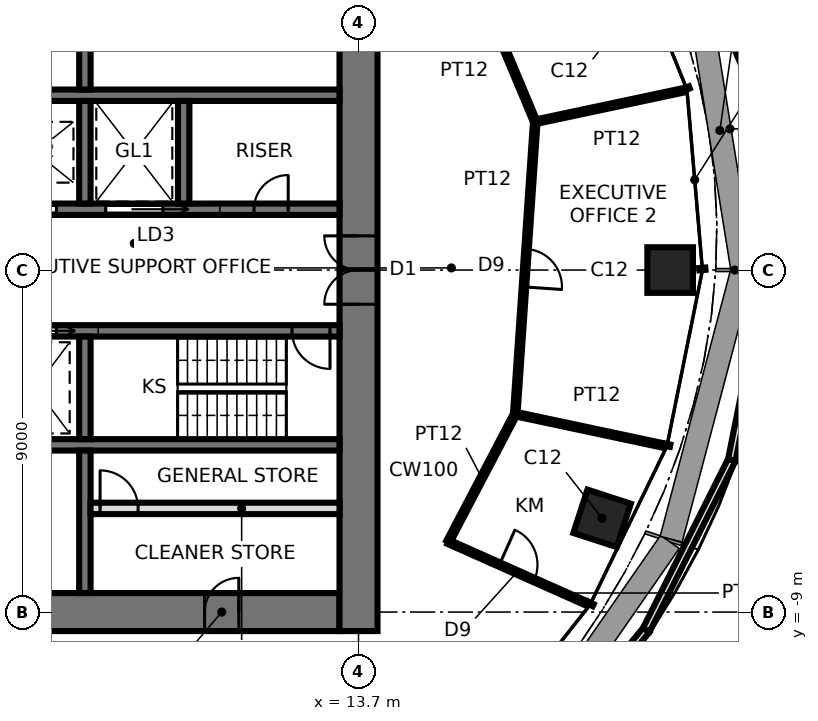
"""IFC4 building model, lengths in metres.
Left out: names, types, materials, properties, quantities, classifications, styles, units other than length and angle.
Written with IfcOpenShell. Run it as: python <this file> out.ifc"""

import sys

from ifc_helpers import new_model, si_unit, direction, frame, frame_2d, origin, origin_2d, place, context, subcontext, project, spatial, rectangle, extrude, element, fill, save


model = new_model("IFC4")
c1 = context("Model", 3, precision=1e-05, world=origin(), true_north=direction((0.0, 1.0)))
c2 = subcontext(c1, "Body", "Model", "MODEL_VIEW")
j1 = project(units=[si_unit("LENGTHUNIT", "METRE"), si_unit("PLANEANGLEUNIT", "RADIAN")], contexts=[c1])
p1 = place(None, origin())
s1 = spatial("IfcSite", under=j1, at=p1, CompositionType="ELEMENT")
p2 = place(p1, origin())
s2 = spatial("IfcBuilding", under=s1, at=p2, CompositionType="ELEMENT")
p3 = place(p2, frame((0.0, 0.0, 251.8)))
s3 = spatial("IfcBuildingStorey", under=s2, at=p3, CompositionType="ELEMENT", Elevation=251.8)
for number, where, z_axis, x_axis in (
    (1, (21.9, 0.0, 0.0), (0.0, 0.0, 1.0), (1.0, 0.0, 0.0)),
    (2, (20.109, -6.534, 0.0), (0.0, 0.0, 1.0), (0.951, -0.309, 0.0)),
):
    element("IfcColumn", number, at=place(p3, frame(where, z_axis=z_axis, x_axis=x_axis)), inside=s3, PredefinedType="COLUMN", context=c2, shape_type="SweptSolid", body=[
        extrude(rectangle(XDim=1.2, YDim=1.2, at=origin_2d()), origin(), (0.0, 0.0, 1.0), 4.2),
    ])
p4 = place(p3, frame((-13.2, -9.0, 0.0), z_axis=(0.0, 0.0, 1.0), x_axis=(1.0, 0.0, 0.0)))
e3 = element("IfcWall", 3, at=p4, inside=s3, PredefinedType="SHEAR", context=c2, shape_type="SweptSolid", body=[
    extrude(rectangle(XDim=26.4, YDim=1.0, at=frame_2d((13.2, 0.0))), origin(), (0.0, 0.0, 1.0), 4.2),
])
p5 = place(p4, frame((2.65, 0.0, 0.0)))
e4 = element("IfcOpeningElement", 4, at=p5, cuts=e3, PredefinedType="OPENING", context=c2, shape_type="SweptSolid", body=[
    extrude(rectangle(XDim=0.9, YDim=2.1, at=frame_2d((0.45, 1.05))), frame((0.0, 0.51, 0.0), z_axis=(0.0, -1.0, 0.0), x_axis=(1.0, 0.0, 0.0)), (0.0, 0.0, 1.0), 1.02),
])
p6 = place(p4, frame((9.5, 0.0, 0.0)))
e5 = element("IfcOpeningElement", 5, at=p6, cuts=e3, PredefinedType="OPENING", context=c2, shape_type="SweptSolid", body=[
    extrude(rectangle(XDim=0.9, YDim=2.1, at=frame_2d((0.45, 1.05))), frame((0.0, 0.51, 0.0), z_axis=(0.0, -1.0, 0.0), x_axis=(1.0, 0.0, 0.0)), (0.0, 0.0, 1.0), 1.02),
])
p7 = place(p4, frame((16.0, 0.0, 0.0)))
e6 = element("IfcOpeningElement", 6, at=p7, cuts=e3, PredefinedType="OPENING", context=c2, shape_type="SweptSolid", body=[
    extrude(rectangle(XDim=0.9, YDim=2.1, at=frame_2d((0.45, 1.05))), frame((0.0, 0.51, 0.0), z_axis=(0.0, -1.0, 0.0), x_axis=(1.0, 0.0, 0.0)), (0.0, 0.0, 1.0), 1.02),
])
p8 = place(p4, frame((22.85, 0.0, 0.0)))
e7 = element("IfcOpeningElement", 7, at=p8, cuts=e3, PredefinedType="OPENING", context=c2, shape_type="SweptSolid", body=[
    extrude(rectangle(XDim=0.9, YDim=2.1, at=frame_2d((0.45, 1.05))), frame((0.0, 0.51, 0.0), z_axis=(0.0, -1.0, 0.0), x_axis=(1.0, 0.0, 0.0)), (0.0, 0.0, 1.0), 1.02),
])
p9 = place(p3, frame((13.7, -9.5, 0.0), z_axis=(0.0, 0.0, 1.0), x_axis=(0.0, 1.0, 0.0)))
e8 = element("IfcWall", 8, at=p9, inside=s3, PredefinedType="SHEAR", context=c2, shape_type="SweptSolid", body=[
    extrude(rectangle(XDim=19.0, YDim=1.0, at=frame_2d((9.5, 0.0))), origin(), (0.0, 0.0, 1.0), 4.2),
])
p10 = place(p9, frame((8.6, 0.0, 0.0)))
e9 = element("IfcOpeningElement", 9, at=p10, cuts=e8, PredefinedType="OPENING", context=c2, shape_type="SweptSolid", body=[
    extrude(rectangle(XDim=1.8, YDim=2.4, at=frame_2d((0.9, 1.2))), frame((0.0, 0.51, 0.0), z_axis=(0.0, -1.0, 0.0), x_axis=(1.0, 0.0, 0.0)), (0.0, 0.0, 1.0), 1.02),
])
p11 = place(p3, frame((-13.2, 1.6, 0.0), z_axis=(0.0, 0.0, 1.0), x_axis=(1.0, 0.0, 0.0)))
e10 = element("IfcWall", 10, at=p11, inside=s3, PredefinedType="SHEAR", context=c2, shape_type="SweptSolid", body=[
    extrude(rectangle(XDim=26.4, YDim=0.3, at=frame_2d((13.2, 0.0))), origin(), (0.0, 0.0, 1.0), 4.2),
])
p12 = place(p11, frame((0.25, 0.0, 0.0)))
e11 = element("IfcOpeningElement", 11, at=p12, cuts=e10, PredefinedType="OPENING", context=c2, shape_type="SweptSolid", body=[
    extrude(rectangle(XDim=1.0, YDim=2.1, at=frame_2d((0.5, 1.05))), frame((0.0, 0.16, 0.0), z_axis=(0.0, -1.0, 0.0), x_axis=(1.0, 0.0, 0.0)), (0.0, 0.0, 1.0), 0.32),
])
p13 = place(p11, frame((20.25, 0.0, 0.0)))
e12 = element("IfcOpeningElement", 12, at=p13, cuts=e10, PredefinedType="OPENING", context=c2, shape_type="SweptSolid", body=[
    extrude(rectangle(XDim=1.5, YDim=2.4, at=frame_2d((0.75, 1.2))), frame((0.0, 0.16, 0.0), z_axis=(0.0, -1.0, 0.0), x_axis=(1.0, 0.0, 0.0)), (0.0, 0.0, 1.0), 0.32),
])
p14 = place(p11, frame((6.95, 0.0, 0.0)))
e13 = element("IfcOpeningElement", 13, at=p14, cuts=e10, PredefinedType="OPENING", context=c2, shape_type="SweptSolid", body=[
    extrude(rectangle(XDim=0.9, YDim=2.1, at=frame_2d((0.45, 1.05))), frame((0.0, 0.16, 0.0), z_axis=(0.0, -1.0, 0.0), x_axis=(1.0, 0.0, 0.0)), (0.0, 0.0, 1.0), 0.32),
])
p15 = place(p11, frame((9.55, 0.0, 0.0)))
e14 = element("IfcOpeningElement", 14, at=p15, cuts=e10, PredefinedType="OPENING", context=c2, shape_type="SweptSolid", body=[
    extrude(rectangle(XDim=0.9, YDim=2.1, at=frame_2d((0.45, 1.05))), frame((0.0, 0.16, 0.0), z_axis=(0.0, -1.0, 0.0), x_axis=(1.0, 0.0, 0.0)), (0.0, 0.0, 1.0), 0.32),
])
p16 = place(p11, frame((12.15, 0.0, 0.0)))
e15 = element("IfcOpeningElement", 15, at=p16, cuts=e10, PredefinedType="OPENING", context=c2, shape_type="SweptSolid", body=[
    extrude(rectangle(XDim=0.9, YDim=2.1, at=frame_2d((0.45, 1.05))), frame((0.0, 0.16, 0.0), z_axis=(0.0, -1.0, 0.0), x_axis=(1.0, 0.0, 0.0)), (0.0, 0.0, 1.0), 0.32),
])
p17 = place(p11, frame((15.25, 0.0, 0.0)))
e16 = element("IfcOpeningElement", 16, at=p17, cuts=e10, PredefinedType="OPENING", context=c2, shape_type="SweptSolid", body=[
    extrude(rectangle(XDim=1.1, YDim=2.3, at=frame_2d((0.55, 1.15))), frame((0.0, 0.16, 0.0), z_axis=(0.0, -1.0, 0.0), x_axis=(1.0, 0.0, 0.0)), (0.0, 0.0, 1.0), 0.32),
])
p18 = place(p11, frame((17.85, 0.0, 0.0)))
e17 = element("IfcOpeningElement", 17, at=p18, cuts=e10, PredefinedType="OPENING", context=c2, shape_type="SweptSolid", body=[
    extrude(rectangle(XDim=1.1, YDim=2.3, at=frame_2d((0.55, 1.15))), frame((0.0, 0.16, 0.0), z_axis=(0.0, -1.0, 0.0), x_axis=(1.0, 0.0, 0.0)), (0.0, 0.0, 1.0), 0.32),
])
p19 = place(p11, frame((24.15, 0.0, 0.0)))
e18 = element("IfcOpeningElement", 18, at=p19, cuts=e10, PredefinedType="OPENING", context=c2, shape_type="SweptSolid", body=[
    extrude(rectangle(XDim=0.9, YDim=2.1, at=frame_2d((0.45, 1.05))), frame((0.0, 0.16, 0.0), z_axis=(0.0, -1.0, 0.0), x_axis=(1.0, 0.0, 0.0)), (0.0, 0.0, 1.0), 0.32),
])
p20 = place(p3, frame((-13.2, -1.6, 0.0), z_axis=(0.0, 0.0, 1.0), x_axis=(1.0, 0.0, 0.0)))
e19 = element("IfcWall", 19, at=p20, inside=s3, PredefinedType="SHEAR", context=c2, shape_type="SweptSolid", body=[
    extrude(rectangle(XDim=26.4, YDim=0.3, at=frame_2d((13.2, 0.0))), origin(), (0.0, 0.0, 1.0), 4.2),
])
p21 = place(p20, frame((25.15, 0.0, 0.0)))
e20 = element("IfcOpeningElement", 20, at=p21, cuts=e19, PredefinedType="OPENING", context=c2, shape_type="SweptSolid", body=[
    extrude(rectangle(XDim=1.0, YDim=2.1, at=frame_2d((0.5, 1.05))), frame((0.0, 0.16, 0.0), z_axis=(0.0, -1.0, 0.0), x_axis=(1.0, 0.0, 0.0)), (0.0, 0.0, 1.0), 0.32),
])
p22 = place(p20, frame((7.55, 0.0, 0.0)))
e21 = element("IfcOpeningElement", 21, at=p22, cuts=e19, PredefinedType="OPENING", context=c2, shape_type="SweptSolid", body=[
    extrude(rectangle(XDim=0.9, YDim=2.1, at=frame_2d((0.45, 1.05))), frame((0.0, 0.16, 0.0), z_axis=(0.0, -1.0, 0.0), x_axis=(1.0, 0.0, 0.0)), (0.0, 0.0, 1.0), 0.32),
])
p23 = place(p20, frame((9.55, 0.0, 0.0)))
e22 = element("IfcOpeningElement", 22, at=p23, cuts=e19, PredefinedType="OPENING", context=c2, shape_type="SweptSolid", body=[
    extrude(rectangle(XDim=0.9, YDim=2.1, at=frame_2d((0.45, 1.05))), frame((0.0, 0.16, 0.0), z_axis=(0.0, -1.0, 0.0), x_axis=(1.0, 0.0, 0.0)), (0.0, 0.0, 1.0), 0.32),
])
p24 = place(p20, frame((12.15, 0.0, 0.0)))
e23 = element("IfcOpeningElement", 23, at=p24, cuts=e19, PredefinedType="OPENING", context=c2, shape_type="SweptSolid", body=[
    extrude(rectangle(XDim=0.9, YDim=2.1, at=frame_2d((0.45, 1.05))), frame((0.0, 0.16, 0.0), z_axis=(0.0, -1.0, 0.0), x_axis=(1.0, 0.0, 0.0)), (0.0, 0.0, 1.0), 0.32),
])
p25 = place(p20, frame((15.25, 0.0, 0.0)))
e24 = element("IfcOpeningElement", 24, at=p25, cuts=e19, PredefinedType="OPENING", context=c2, shape_type="SweptSolid", body=[
    extrude(rectangle(XDim=1.1, YDim=2.3, at=frame_2d((0.55, 1.15))), frame((0.0, 0.16, 0.0), z_axis=(0.0, -1.0, 0.0), x_axis=(1.0, 0.0, 0.0)), (0.0, 0.0, 1.0), 0.32),
])
p26 = place(p20, frame((17.85, 0.0, 0.0)))
e25 = element("IfcOpeningElement", 25, at=p26, cuts=e19, PredefinedType="OPENING", context=c2, shape_type="SweptSolid", body=[
    extrude(rectangle(XDim=1.1, YDim=2.3, at=frame_2d((0.55, 1.15))), frame((0.0, 0.16, 0.0), z_axis=(0.0, -1.0, 0.0), x_axis=(1.0, 0.0, 0.0)), (0.0, 0.0, 1.0), 0.32),
])
p27 = place(p20, frame((5.55, 0.0, 0.0)))
e26 = element("IfcOpeningElement", 26, at=p27, cuts=e19, PredefinedType="OPENING", context=c2, shape_type="SweptSolid", body=[
    extrude(rectangle(XDim=0.9, YDim=2.1, at=frame_2d((0.45, 1.05))), frame((0.0, 0.16, 0.0), z_axis=(0.0, -1.0, 0.0), x_axis=(1.0, 0.0, 0.0)), (0.0, 0.0, 1.0), 0.32),
])
for number, where, z_axis, x_axis in (
    (27, (-13.2, 4.6, 0.0), (0.0, 0.0, 1.0), (1.0, 0.0, 0.0)),
    (28, (-13.2, -4.6, 0.0), (0.0, 0.0, 1.0), (1.0, 0.0, 0.0)),
):
    element("IfcWall", number, at=place(p3, frame(where, z_axis=z_axis, x_axis=x_axis)), inside=s3, PredefinedType="SHEAR", context=c2, shape_type="SweptSolid", body=[
        extrude(rectangle(XDim=26.4, YDim=0.3, at=frame_2d((13.2, 0.0))), origin(), (0.0, 0.0, 1.0), 4.2),
    ])
p28 = place(p3, frame((6.5, 1.75, 0.0), z_axis=(0.0, 0.0, 1.0), x_axis=(0.0, 1.0, 0.0)))
e29 = element("IfcWall", 29, at=p28, inside=s3, PredefinedType="SHEAR", context=c2, shape_type="SweptSolid", body=[
    extrude(rectangle(XDim=2.7, YDim=0.3, at=frame_2d((1.35, 0.0))), origin(), (0.0, 0.0, 1.0), 4.2),
])
p29 = place(p3, frame((6.5, 4.75, 0.0), z_axis=(0.0, 0.0, 1.0), x_axis=(0.0, 1.0, 0.0)))
e30 = element("IfcWall", 30, at=p29, inside=s3, PredefinedType="SHEAR", context=c2, shape_type="SweptSolid", body=[
    extrude(rectangle(XDim=3.75, YDim=0.3, at=frame_2d((1.875, 0.0))), origin(), (0.0, 0.0, 1.0), 4.2),
])
p30 = place(p3, frame((6.5, -1.75, 0.0), z_axis=(0.0, 0.0, 1.0), x_axis=(0.0, -1.0, 0.0)))
e31 = element("IfcWall", 31, at=p30, inside=s3, PredefinedType="SHEAR", context=c2, shape_type="SweptSolid", body=[
    extrude(rectangle(XDim=2.7, YDim=0.3, at=frame_2d((1.35, 0.0))), origin(), (0.0, 0.0, 1.0), 4.2),
])
p31 = place(p3, frame((6.5, -4.75, 0.0), z_axis=(0.0, 0.0, 1.0), x_axis=(0.0, -1.0, 0.0)))
e32 = element("IfcWall", 32, at=p31, inside=s3, PredefinedType="SHEAR", context=c2, shape_type="SweptSolid", body=[
    extrude(rectangle(XDim=3.75, YDim=0.3, at=frame_2d((1.875, 0.0))), origin(), (0.0, 0.0, 1.0), 4.2),
])
p32 = place(p3, frame((9.1, 1.75, 0.0), z_axis=(0.0, 0.0, 1.0), x_axis=(0.0, 1.0, 0.0)))
e33 = element("IfcWall", 33, at=p32, inside=s3, PredefinedType="SHEAR", context=c2, shape_type="SweptSolid", body=[
    extrude(rectangle(XDim=2.7, YDim=0.3, at=frame_2d((1.35, 0.0))), origin(), (0.0, 0.0, 1.0), 4.2),
])
p33 = place(p3, frame((24.004, 5.102, 0.0), z_axis=(0.0, 0.0, 1.0), x_axis=(-0.3953624821, 0.918525180791, 0.0)))
e34 = element("IfcWall", 34, at=p33, inside=s3, PredefinedType="PARAPET", context=c2, shape_type="SweptSolid", body=[
    extrude(rectangle(XDim=5.103, YDim=0.2, at=frame_2d((2.551, 0.0))), origin(), (0.0, 0.0, 1.0), 1.1),
])
p34 = place(p3, frame((18.183, -13.211, 0.0), z_axis=(0.0, 0.0, 1.0), x_axis=(0.636851530046, 0.770986464653, 0.0)))
e35 = element("IfcWall", 35, at=p34, inside=s3, PredefinedType="PARAPET", context=c2, shape_type="SweptSolid", body=[
    extrude(rectangle(XDim=4.851, YDim=0.2, at=frame_2d((2.425, 0.0))), origin(), (0.0, 0.0, 1.0), 1.1),
])
p35 = place(p3, frame((21.272, -9.471, 0.0), z_axis=(0.0, 0.0, 1.0), x_axis=(0.449377961482, 0.893341730657, 0.0)))
e36 = element("IfcWall", 36, at=p35, inside=s3, PredefinedType="PARAPET", context=c2, shape_type="SweptSolid", body=[
    extrude(rectangle(XDim=5.005, YDim=0.2, at=frame_2d((2.503, 0.0))), origin(), (0.0, 0.0, 1.0), 1.1),
])
p36 = place(p3, frame((23.521, -5.0, 0.0), z_axis=(0.0, 0.0, 1.0), x_axis=(0.19659491086, 0.980484798976, 0.0)))
e37 = element("IfcWall", 37, at=p36, inside=s3, PredefinedType="PARAPET", context=c2, shape_type="SweptSolid", body=[
    extrude(rectangle(XDim=5.099, YDim=0.2, at=frame_2d((2.55, 0.0))), origin(), (0.0, 0.0, 1.0), 1.1),
])
p37 = place(p3, frame((6.65, -6.272, 0.0), z_axis=(0.0, 0.0, 1.0), x_axis=(1.0, 0.0, 0.0)))
e38 = element("IfcWall", 38, at=p37, inside=s3, PredefinedType="PARTITIONING", context=c2, shape_type="SweptSolid", body=[
    extrude(rectangle(XDim=6.55, YDim=0.3, at=frame_2d((3.275, 0.0))), origin(), (0.0, 0.0, 1.0), 4.04),
])
p38 = place(p37, frame((0.25, 0.0, 0.0)))
e39 = element("IfcOpeningElement", 39, at=p38, cuts=e38, PredefinedType="OPENING", context=c2, shape_type="SweptSolid", body=[
    extrude(rectangle(XDim=1.0, YDim=2.4, at=frame_2d((0.5, 1.2))), frame((0.0, 0.16, 0.0), z_axis=(0.0, -1.0, 0.0), x_axis=(1.0, 0.0, 0.0)), (0.0, 0.0, 1.0), 0.32),
])
p39 = place(p3, frame((16.062, -7.152, 0.0), z_axis=(0.0, 0.0, 1.0), x_axis=(0.913572283964, -0.406676384824, 0.0)))
e40 = element("IfcWall", 40, at=p39, inside=s3, PredefinedType="PARTITIONING", context=c2, shape_type="SweptSolid", body=[
    extrude(rectangle(XDim=4.0, YDim=0.12, at=frame_2d((2.0, 0.0))), origin(), (0.0, 0.0, 1.0), 4.04),
])
p40 = place(p39, frame((1.474, 0.0, 0.0)))
e41 = element("IfcOpeningElement", 41, at=p40, cuts=e40, PredefinedType="OPENING", context=c2, shape_type="SweptSolid", body=[
    extrude(rectangle(XDim=1.0, YDim=2.4, at=frame_2d((0.5, 1.2))), frame((0.0, 0.07, 0.0), z_axis=(0.0, -1.0, 0.0), x_axis=(1.0, 0.0, 0.0)), (0.0, 0.0, 1.0), 0.14),
])
p41 = place(p3, frame((17.824, -3.789, 0.0), z_axis=(0.0, 0.0, 1.0), x_axis=(-0.464033426365, -0.885817689604, 0.0)))
e42 = element("IfcWall", 42, at=p41, inside=s3, PredefinedType="PARTITIONING", context=c2, shape_type="SweptSolid", body=[
    extrude(rectangle(XDim=3.797, YDim=0.12, at=frame_2d((1.898, 0.0))), origin(), (0.0, 0.0, 1.0), 4.04),
])
p42 = place(p3, frame((17.824, -3.789, 0.0), z_axis=(0.0, 0.0, 1.0), x_axis=(0.978140543132, -0.207944891454, 0.0)))
e43 = element("IfcWall", 43, at=p42, inside=s3, PredefinedType="PARTITIONING", context=c2, shape_type="SweptSolid", body=[
    extrude(rectangle(XDim=4.0, YDim=0.12, at=frame_2d((2.0, 0.0))), origin(), (0.0, 0.0, 1.0), 4.04),
])
p43 = place(p3, frame((18.351, 3.901, 0.0), z_axis=(0.0, 0.0, 1.0), x_axis=(-0.068390063315, -0.99765865868, 0.0)))
e44 = element("IfcWall", 44, at=p43, inside=s3, PredefinedType="PARTITIONING", context=c2, shape_type="SweptSolid", body=[
    extrude(rectangle(XDim=7.707, YDim=0.12, at=frame_2d((3.854, 0.0))), origin(), (0.0, 0.0, 1.0), 4.04),
])
p44 = place(p43, frame((3.354, 0.0, 0.0)))
e45 = element("IfcOpeningElement", 45, at=p44, cuts=e44, PredefinedType="OPENING", context=c2, shape_type="SweptSolid", body=[
    extrude(rectangle(XDim=1.0, YDim=2.4, at=frame_2d((0.5, 1.2))), frame((0.0, 0.07, 0.0), z_axis=(0.0, -1.0, 0.0), x_axis=(1.0, 0.0, 0.0)), (0.0, 0.0, 1.0), 0.14),
])
p45 = place(p3, frame((18.351, 3.901, 0.0), z_axis=(0.0, 0.0, 1.0), x_axis=(0.978140543132, 0.207944891454, 0.0)))
e46 = element("IfcWall", 46, at=p45, inside=s3, PredefinedType="PARTITIONING", context=c2, shape_type="SweptSolid", body=[
    extrude(rectangle(XDim=4.0, YDim=0.12, at=frame_2d((2.0, 0.0))), origin(), (0.0, 0.0, 1.0), 4.04),
])
p46 = place(p3, frame((16.842, 7.499, 0.0), z_axis=(0.0, 0.0, 1.0), x_axis=(0.38675585774, -0.922182143887, 0.0)))
e47 = element("IfcWall", 47, at=p46, inside=s3, PredefinedType="PARTITIONING", context=c2, shape_type="SweptSolid", body=[
    extrude(rectangle(XDim=3.902, YDim=0.12, at=frame_2d((1.951, 0.0))), origin(), (0.0, 0.0, 1.0), 4.04),
])
p47 = place(p10, origin())
e48 = element("IfcDoor", 48, at=p47, inside=s3, OperationType="DOUBLE_DOOR_SINGLE_SWING", PredefinedType="DOOR", context=c2, shape_type="SweptSolid", body=[
    extrude(rectangle(XDim=1.72, YDim=2.36, at=frame_2d((0.9, 1.18))), frame((0.0, 0.025, 0.0), z_axis=(0.0, -1.0, 0.0), x_axis=(1.0, 0.0, 0.0)), (0.0, 0.0, 1.0), 0.05),
    extrude(rectangle(XDim=0.04, YDim=2.4, at=frame_2d((0.02, 1.2))), frame((0.0, 0.25, 0.0), z_axis=(0.0, -1.0, 0.0), x_axis=(1.0, 0.0, 0.0)), (0.0, 0.0, 1.0), 0.5),
    extrude(rectangle(XDim=0.04, YDim=2.4, at=frame_2d((1.78, 1.2))), frame((0.0, 0.25, 0.0), z_axis=(0.0, -1.0, 0.0), x_axis=(1.0, 0.0, 0.0)), (0.0, 0.0, 1.0), 0.5),
    extrude(rectangle(XDim=1.72, YDim=0.04, at=frame_2d((0.9, 2.38))), frame((0.0, 0.25, 0.0), z_axis=(0.0, -1.0, 0.0), x_axis=(1.0, 0.0, 0.0)), (0.0, 0.0, 1.0), 0.5),
])
fill(e9, e48)
p48 = place(p21, frame((1.0, 0.0, 0.0), z_axis=(0.0, 0.0, 1.0), x_axis=(-1.0, 0.0, 0.0)))
e49 = element("IfcDoor", 49, at=p48, inside=s3, OperationType="SINGLE_SWING_LEFT", PredefinedType="DOOR", context=c2, shape_type="SweptSolid", body=[
    extrude(rectangle(XDim=1.0, YDim=2.1, at=frame_2d((0.5, 1.05))), frame((0.0, 0.025, 0.0), z_axis=(0.0, -1.0, 0.0), x_axis=(1.0, 0.0, 0.0)), (0.0, 0.0, 1.0), 0.05),
])
fill(e20, e49)
p49 = place(p13, origin())
e50 = element("IfcDoor", 50, at=p49, inside=s3, OperationType="SLIDING_TO_RIGHT", PredefinedType="DOOR", context=c2, shape_type="SweptSolid", body=[
    extrude(rectangle(XDim=1.5, YDim=2.4, at=frame_2d((0.75, 1.2))), frame((0.0, 0.025, 0.0), z_axis=(0.0, -1.0, 0.0), x_axis=(1.0, 0.0, 0.0)), (0.0, 0.0, 1.0), 0.05),
])
fill(e12, e50)
p50 = place(p18, origin())
e51 = element("IfcDoor", 51, at=p50, inside=s3, OperationType="SLIDING_TO_LEFT", PredefinedType="DOOR", context=c2, shape_type="SweptSolid", body=[
    extrude(rectangle(XDim=1.1, YDim=2.3, at=frame_2d((0.55, 1.15))), frame((0.0, 0.025, 0.0), z_axis=(0.0, -1.0, 0.0), x_axis=(1.0, 0.0, 0.0)), (0.0, 0.0, 1.0), 0.05),
])
fill(e17, e51)
p51 = place(p26, frame((1.1, 0.0, 0.0), z_axis=(0.0, 0.0, 1.0), x_axis=(-1.0, 0.0, 0.0)))
e52 = element("IfcDoor", 52, at=p51, inside=s3, OperationType="SLIDING_TO_LEFT", PredefinedType="DOOR", context=c2, shape_type="SweptSolid", body=[
    extrude(rectangle(XDim=1.1, YDim=2.3, at=frame_2d((0.55, 1.15))), frame((0.0, 0.025, 0.0), z_axis=(0.0, -1.0, 0.0), x_axis=(1.0, 0.0, 0.0)), (0.0, 0.0, 1.0), 0.05),
])
fill(e25, e52)
p52 = place(p19, origin())
e53 = element("IfcDoor", 53, at=p52, inside=s3, OperationType="SINGLE_SWING_RIGHT", PredefinedType="DOOR", context=c2, shape_type="SweptSolid", body=[
    extrude(rectangle(XDim=0.9, YDim=2.1, at=frame_2d((0.45, 1.05))), frame((0.0, 0.025, 0.0), z_axis=(0.0, -1.0, 0.0), x_axis=(1.0, 0.0, 0.0)), (0.0, 0.0, 1.0), 0.05),
])
fill(e18, e53)
p53 = place(p8, origin())
e54 = element("IfcDoor", 54, at=p53, inside=s3, OperationType="SINGLE_SWING_RIGHT", PredefinedType="DOOR", context=c2, shape_type="SweptSolid", body=[
    extrude(rectangle(XDim=0.82, YDim=2.06, at=frame_2d((0.45, 1.03))), frame((0.0, 0.025, 0.0), z_axis=(0.0, -1.0, 0.0), x_axis=(1.0, 0.0, 0.0)), (0.0, 0.0, 1.0), 0.05),
    extrude(rectangle(XDim=0.04, YDim=2.1, at=frame_2d((0.02, 1.05))), frame((0.0, 0.25, 0.0), z_axis=(0.0, -1.0, 0.0), x_axis=(1.0, 0.0, 0.0)), (0.0, 0.0, 1.0), 0.5),
    extrude(rectangle(XDim=0.04, YDim=2.1, at=frame_2d((0.88, 1.05))), frame((0.0, 0.25, 0.0), z_axis=(0.0, -1.0, 0.0), x_axis=(1.0, 0.0, 0.0)), (0.0, 0.0, 1.0), 0.5),
    extrude(rectangle(XDim=0.82, YDim=0.04, at=frame_2d((0.45, 2.08))), frame((0.0, 0.25, 0.0), z_axis=(0.0, -1.0, 0.0), x_axis=(1.0, 0.0, 0.0)), (0.0, 0.0, 1.0), 0.5),
])
fill(e7, e54)
p54 = place(p38, origin())
e55 = element("IfcDoor", 55, at=p54, inside=s3, OperationType="SINGLE_SWING_LEFT", PredefinedType="DOOR", context=c2, shape_type="SweptSolid", body=[
    extrude(rectangle(XDim=1.0, YDim=2.4, at=frame_2d((0.5, 1.2))), frame((0.0, 0.025, 0.0), z_axis=(0.0, -1.0, 0.0), x_axis=(1.0, 0.0, 0.0)), (0.0, 0.0, 1.0), 0.05),
])
fill(e39, e55)
p55 = place(p40, origin())
e56 = element("IfcDoor", 56, at=p55, inside=s3, OperationType="SINGLE_SWING_LEFT", PredefinedType="DOOR", context=c2, shape_type="SweptSolid", body=[
    extrude(rectangle(XDim=1.0, YDim=2.4, at=frame_2d((0.5, 1.2))), frame((0.0, 0.025, 0.0), z_axis=(0.0, -1.0, 0.0), x_axis=(1.0, 0.0, 0.0)), (0.0, 0.0, 1.0), 0.05),
])
fill(e41, e56)
p56 = place(p44, origin())
e57 = element("IfcDoor", 57, at=p56, inside=s3, OperationType="SINGLE_SWING_RIGHT", PredefinedType="DOOR", context=c2, shape_type="SweptSolid", body=[
    extrude(rectangle(XDim=1.0, YDim=2.4, at=frame_2d((0.5, 1.2))), frame((0.0, 0.025, 0.0), z_axis=(0.0, -1.0, 0.0), x_axis=(1.0, 0.0, 0.0)), (0.0, 0.0, 1.0), 0.05),
])
fill(e45, e57)
save(model, sys.argv[1])
